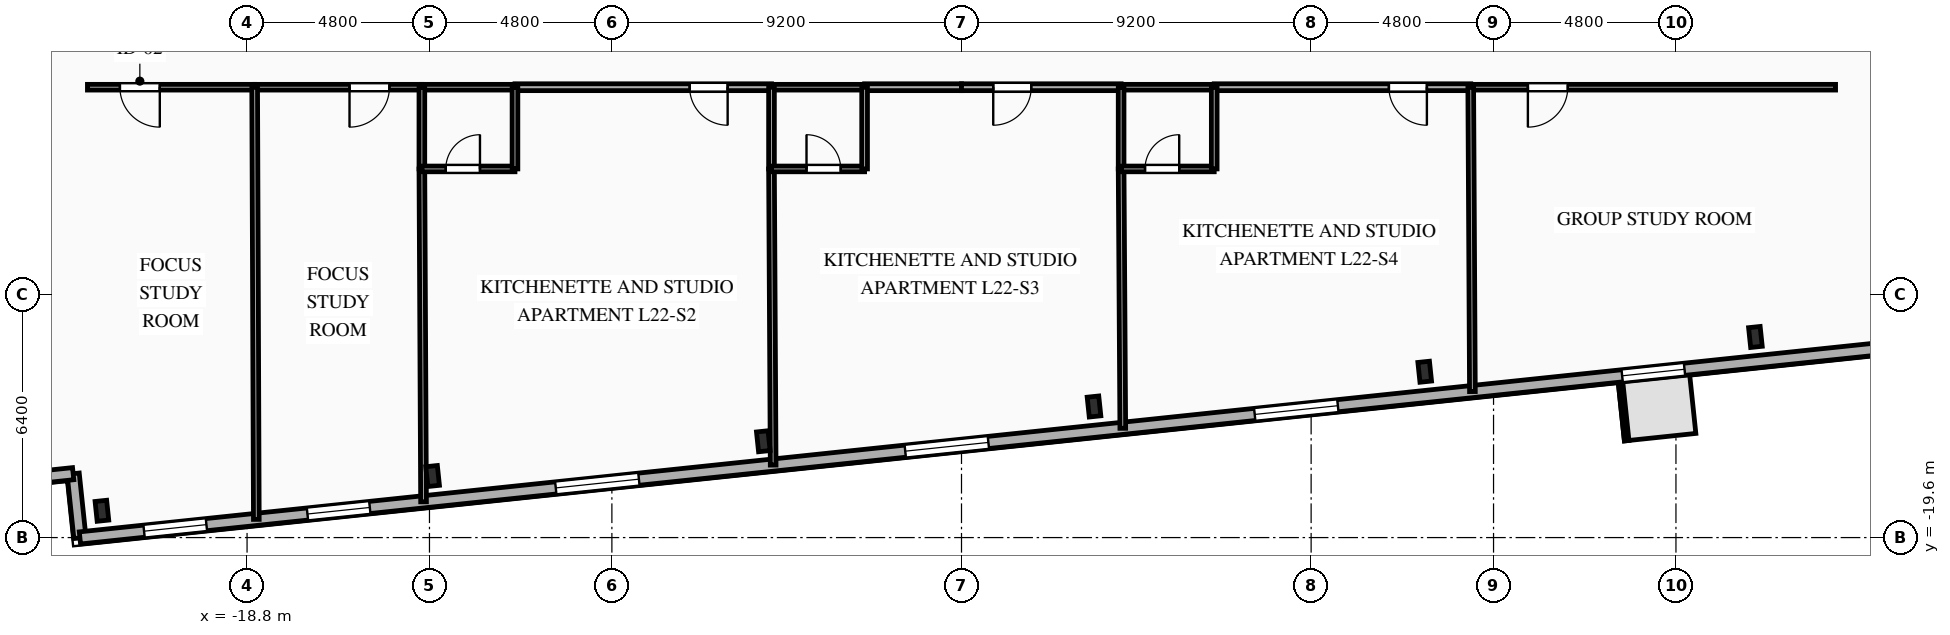
"""IFC4 building model, lengths in metres.
Left out: names, types, materials, properties, quantities, classifications, styles, units other than length and angle.
Written with IfcOpenShell. Run it as: python <this file> out.ifc"""

import sys

from ifc_helpers import new_model, si_unit, direction, frame, frame_2d, origin, origin_2d, place, context, subcontext, project, spatial, rectangle, i_section, extrude, element, fill, save


model = new_model("IFC4")
c1 = context("Model", 3, precision=1e-05, world=origin(), true_north=direction((0.0, 1.0)))
c2 = subcontext(c1, "Body", "Model", "MODEL_VIEW")
j1 = project(units=[si_unit("LENGTHUNIT", "METRE"), si_unit("PLANEANGLEUNIT", "RADIAN")], contexts=[c1])
p1 = place(None, origin())
s1 = spatial("IfcSite", under=j1, at=p1, CompositionType="ELEMENT")
p2 = place(p1, origin())
s2 = spatial("IfcBuilding", under=s1, at=p2, CompositionType="ELEMENT")
p3 = place(p2, frame((0.0, 0.0, 82.35)))
s3 = spatial("IfcBuildingStorey", under=s2, at=p3, CompositionType="ELEMENT", Elevation=82.35)
for number, where, z_axis, x_axis in (
    (1, (-22.619, -18.895, 0.0), (0.0, 0.0, 1.0), (0.995, 0.105, 0.0)),
    (2, (-13.917, -17.98, 0.0), (0.0, 0.0, 1.0), (0.995, 0.105, 0.0)),
    (3, (-5.215, -17.066, 0.0), (0.0, 0.0, 1.0), (0.995, 0.105, 0.0)),
    (4, (3.487, -16.151, 0.0), (0.0, 0.0, 1.0), (0.995, 0.105, 0.0)),
    (5, (12.189, -15.237, 0.0), (0.0, 0.0, 1.0), (0.995, 0.105, 0.0)),
    (6, (20.891, -14.322, 0.0), (0.0, 0.0, 1.0), (0.995, 0.105, 0.0)),
):
    element("IfcColumn", number, at=place(p3, frame(where, z_axis=z_axis, x_axis=x_axis)), inside=s3, PredefinedType="COLUMN", context=c2, shape_type="SweptSolid", body=[
        extrude(i_section(OverallWidth=0.306, OverallDepth=0.524, WebThickness=0.021, FlangeThickness=0.04, FilletRadius=0.027, at=origin_2d()), origin(), (0.0, 0.0, 1.0), 3.35),
    ])
for number, where, z_axis, x_axis in (
    (7, (-23.198, -19.609, 0.0), (0.0, 0.0, 1.0), (-0.105, 0.995, 0.0)),
    (8, (-23.376, -17.919, 0.0), (0.0, 0.0, 1.0), (-0.995, -0.105, 0.0)),
):
    element("IfcWall", number, at=place(p3, frame(where, z_axis=z_axis, x_axis=x_axis)), inside=s3, PredefinedType="SOLIDWALL", context=c2, shape_type="SweptSolid", body=[
        extrude(rectangle(XDim=1.7, YDim=0.32, at=frame_2d((0.85, 0.0))), origin(), (0.0, 0.0, 1.0), 3.045),
    ])
p4 = place(p3, frame((30.307, -13.986, 0.0), z_axis=(0.0, 0.0, 1.0), x_axis=(-0.994521628355, -0.104531003701, 0.0)))
e9 = element("IfcWall", 9, at=p4, inside=s3, PredefinedType="SOLIDWALL", context=c2, shape_type="SweptSolid", body=[
    extrude(rectangle(XDim=53.8, YDim=0.32, at=frame_2d((26.9, 0.0))), origin(), (0.0, 0.0, 1.0), 3.045),
])
p5 = place(p4, frame((11.344, 0.0, 0.85)))
e10 = element("IfcOpeningElement", 10, at=p5, cuts=e9, PredefinedType="OPENING", context=c2, shape_type="SweptSolid", body=[
    extrude(rectangle(XDim=1.65, YDim=1.85, at=frame_2d((0.825, 0.925))), frame((0.0, 0.17, 0.0), z_axis=(0.0, -1.0, 0.0), x_axis=(1.0, 0.0, 0.0)), (0.0, 0.0, 1.0), 0.34),
])
p6 = place(p4, frame((20.516, 0.0, 0.85)))
e11 = element("IfcOpeningElement", 11, at=p6, cuts=e9, PredefinedType="OPENING", context=c2, shape_type="SweptSolid", body=[
    extrude(rectangle(XDim=2.2, YDim=1.85, at=frame_2d((1.1, 0.925))), frame((0.0, 0.17, 0.0), z_axis=(0.0, -1.0, 0.0), x_axis=(1.0, 0.0, 0.0)), (0.0, 0.0, 1.0), 0.34),
])
p7 = place(p4, frame((29.763, 0.0, 0.85)))
e12 = element("IfcOpeningElement", 12, at=p7, cuts=e9, PredefinedType="OPENING", context=c2, shape_type="SweptSolid", body=[
    extrude(rectangle(XDim=2.2, YDim=1.85, at=frame_2d((1.1, 0.925))), frame((0.0, 0.17, 0.0), z_axis=(0.0, -1.0, 0.0), x_axis=(1.0, 0.0, 0.0)), (0.0, 0.0, 1.0), 0.34),
])
p8 = place(p4, frame((39.01, 0.0, 0.85)))
e13 = element("IfcOpeningElement", 13, at=p8, cuts=e9, PredefinedType="OPENING", context=c2, shape_type="SweptSolid", body=[
    extrude(rectangle(XDim=2.2, YDim=1.85, at=frame_2d((1.1, 0.925))), frame((0.0, 0.17, 0.0), z_axis=(0.0, -1.0, 0.0), x_axis=(1.0, 0.0, 0.0)), (0.0, 0.0, 1.0), 0.34),
])
p9 = place(p4, frame((46.13, 0.0, 0.85)))
e14 = element("IfcOpeningElement", 14, at=p9, cuts=e9, PredefinedType="OPENING", context=c2, shape_type="SweptSolid", body=[
    extrude(rectangle(XDim=1.65, YDim=1.85, at=frame_2d((0.825, 0.925))), frame((0.0, 0.17, 0.0), z_axis=(0.0, -1.0, 0.0), x_axis=(1.0, 0.0, 0.0)), (0.0, 0.0, 1.0), 0.34),
])
p10 = place(p4, frame((50.453, 0.0, 0.85)))
e15 = element("IfcOpeningElement", 15, at=p10, cuts=e9, PredefinedType="OPENING", context=c2, shape_type="SweptSolid", body=[
    extrude(rectangle(XDim=1.65, YDim=1.85, at=frame_2d((0.825, 0.925))), frame((0.0, 0.17, 0.0), z_axis=(0.0, -1.0, 0.0), x_axis=(1.0, 0.0, 0.0)), (0.0, 0.0, 1.0), 0.34),
])
p11 = place(p3, frame((-18.6, -7.75, 0.0), z_axis=(0.0, 0.0, 1.0), x_axis=(-1.0, 0.0, 0.0)))
e16 = element("IfcWall", 16, at=p11, inside=s3, PredefinedType="PARTITIONING", context=c2, shape_type="SweptSolid", body=[
    extrude(rectangle(XDim=4.4, YDim=0.15, at=frame_2d((2.2, 0.0))), origin(), (0.0, 0.0, 1.0), 3.045),
])
p12 = place(p11, frame((2.496, 0.0, 0.0)))
e17 = element("IfcOpeningElement", 17, at=p12, cuts=e16, PredefinedType="OPENING", context=c2, shape_type="SweptSolid", body=[
    extrude(rectangle(XDim=1.05, YDim=2.15, at=frame_2d((0.525, 1.075))), frame((0.0, 0.085, 0.0), z_axis=(0.0, -1.0, 0.0), x_axis=(1.0, 0.0, 0.0)), (0.0, 0.0, 1.0), 0.17),
])
p13 = place(p3, frame((-14.2, -7.75, 0.0), z_axis=(0.0, 0.0, 1.0), x_axis=(-1.0, 0.0, 0.0)))
e18 = element("IfcWall", 18, at=p13, inside=s3, PredefinedType="PARTITIONING", context=c2, shape_type="SweptSolid", body=[
    extrude(rectangle(XDim=4.4, YDim=0.15, at=frame_2d((2.2, 0.0))), origin(), (0.0, 0.0, 1.0), 3.045),
])
p14 = place(p13, frame((0.854, 0.0, 0.0)))
e19 = element("IfcOpeningElement", 19, at=p14, cuts=e18, PredefinedType="OPENING", context=c2, shape_type="SweptSolid", body=[
    extrude(rectangle(XDim=1.05, YDim=2.15, at=frame_2d((0.525, 1.075))), frame((0.0, 0.085, 0.0), z_axis=(0.0, -1.0, 0.0), x_axis=(1.0, 0.0, 0.0)), (0.0, 0.0, 1.0), 0.17),
])
p15 = place(p3, frame((-5.0, -7.75, 0.0), z_axis=(0.0, 0.0, 1.0), x_axis=(-1.0, 0.0, 0.0)))
e20 = element("IfcWall", 20, at=p15, inside=s3, PredefinedType="PARTITIONING", context=c2, shape_type="SweptSolid", body=[
    extrude(rectangle(XDim=6.75, YDim=0.18, at=frame_2d((3.375, 0.0))), origin(), (0.0, 0.0, 1.0), 3.045),
])
p16 = place(p15, frame((1.154, 0.0, 0.0)))
e21 = element("IfcOpeningElement", 21, at=p16, cuts=e20, PredefinedType="OPENING", context=c2, shape_type="SweptSolid", body=[
    extrude(rectangle(XDim=1.0, YDim=2.15, at=frame_2d((0.5, 1.075))), frame((0.0, 0.1, 0.0), z_axis=(0.0, -1.0, 0.0), x_axis=(1.0, 0.0, 0.0)), (0.0, 0.0, 1.0), 0.2),
])
p17 = place(p3, frame((-11.75, -7.75, 0.0), z_axis=(0.0, 0.0, 1.0), x_axis=(-1.0, 0.0, 0.0)))
e22 = element("IfcWall", 22, at=p17, inside=s3, PredefinedType="PLUMBINGWALL", context=c2, shape_type="SweptSolid", body=[
    extrude(rectangle(XDim=2.45, YDim=0.15, at=frame_2d((1.225, 0.0))), origin(), (0.0, 0.0, 1.0), 3.045),
])
p18 = place(p3, frame((0.0, -7.75, 0.0), z_axis=(0.0, 0.0, 1.0), x_axis=(-1.0, 0.0, 0.0)))
e23 = element("IfcWall", 23, at=p18, inside=s3, PredefinedType="PARTITIONING", context=c2, shape_type="SweptSolid", body=[
    extrude(rectangle(XDim=2.55, YDim=0.18, at=frame_2d((1.275, 0.0))), origin(), (0.0, 0.0, 1.0), 3.045),
])
p19 = place(p3, frame((-2.55, -7.75, 0.0), z_axis=(0.0, 0.0, 1.0), x_axis=(-1.0, 0.0, 0.0)))
e24 = element("IfcWall", 24, at=p19, inside=s3, PredefinedType="PLUMBINGWALL", context=c2, shape_type="SweptSolid", body=[
    extrude(rectangle(XDim=2.45, YDim=0.15, at=frame_2d((1.225, 0.0))), origin(), (0.0, 0.0, 1.0), 3.045),
])
p20 = place(p3, frame((4.2, -7.75, 0.0), z_axis=(0.0, 0.0, 1.0), x_axis=(-1.0, 0.0, 0.0)))
e25 = element("IfcWall", 25, at=p20, inside=s3, PredefinedType="PARTITIONING", context=c2, shape_type="SweptSolid", body=[
    extrude(rectangle(XDim=4.2, YDim=0.18, at=frame_2d((2.1, 0.0))), origin(), (0.0, 0.0, 1.0), 3.045),
])
p21 = place(p20, frame((2.365, 0.0, 0.0)))
e26 = element("IfcOpeningElement", 26, at=p21, cuts=e25, PredefinedType="OPENING", context=c2, shape_type="SweptSolid", body=[
    extrude(rectangle(XDim=1.0, YDim=2.15, at=frame_2d((0.5, 1.075))), frame((0.0, 0.1, 0.0), z_axis=(0.0, -1.0, 0.0), x_axis=(1.0, 0.0, 0.0)), (0.0, 0.0, 1.0), 0.2),
])
p22 = place(p3, frame((13.4, -7.75, 0.0), z_axis=(0.0, 0.0, 1.0), x_axis=(-1.0, 0.0, 0.0)))
e27 = element("IfcWall", 27, at=p22, inside=s3, PredefinedType="PARTITIONING", context=c2, shape_type="SweptSolid", body=[
    extrude(rectangle(XDim=6.75, YDim=0.18, at=frame_2d((3.375, 0.0))), origin(), (0.0, 0.0, 1.0), 3.045),
])
p23 = place(p22, frame((1.154, 0.0, 0.0)))
e28 = element("IfcOpeningElement", 28, at=p23, cuts=e27, PredefinedType="OPENING", context=c2, shape_type="SweptSolid", body=[
    extrude(rectangle(XDim=1.0, YDim=2.15, at=frame_2d((0.5, 1.075))), frame((0.0, 0.1, 0.0), z_axis=(0.0, -1.0, 0.0), x_axis=(1.0, 0.0, 0.0)), (0.0, 0.0, 1.0), 0.2),
])
p24 = place(p3, frame((6.65, -7.75, 0.0), z_axis=(0.0, 0.0, 1.0), x_axis=(-1.0, 0.0, 0.0)))
e29 = element("IfcWall", 29, at=p24, inside=s3, PredefinedType="PLUMBINGWALL", context=c2, shape_type="SweptSolid", body=[
    extrude(rectangle(XDim=2.45, YDim=0.15, at=frame_2d((1.225, 0.0))), origin(), (0.0, 0.0, 1.0), 3.045),
])
p25 = place(p3, frame((23.0, -7.75, 0.0), z_axis=(0.0, 0.0, 1.0), x_axis=(-1.0, 0.0, 0.0)))
e30 = element("IfcWall", 30, at=p25, inside=s3, PredefinedType="PARTITIONING", context=c2, shape_type="SweptSolid", body=[
    extrude(rectangle(XDim=9.6, YDim=0.15, at=frame_2d((4.8, 0.0))), origin(), (0.0, 0.0, 1.0), 3.045),
])
p26 = place(p25, frame((7.046, 0.0, 0.0)))
e31 = element("IfcOpeningElement", 31, at=p26, cuts=e30, PredefinedType="OPENING", context=c2, shape_type="SweptSolid", body=[
    extrude(rectangle(XDim=1.05, YDim=2.15, at=frame_2d((0.525, 1.075))), frame((0.0, 0.085, 0.0), z_axis=(0.0, -1.0, 0.0), x_axis=(1.0, 0.0, 0.0)), (0.0, 0.0, 1.0), 0.17),
])
p27 = place(p3, frame((-18.6, -7.75, 0.0), z_axis=(0.0, 0.0, 1.0), x_axis=(0.003864456523, -0.99999253296, 0.0)))
e32 = element("IfcWall", 32, at=p27, inside=s3, PredefinedType="PARTITIONING", context=c2, shape_type="SweptSolid", body=[
    extrude(rectangle(XDim=11.372, YDim=0.15, at=frame_2d((5.686, 0.0))), origin(), (0.0, 0.0, 1.0), 3.045),
])
p28 = place(p3, frame((-14.2, -9.9, 0.0), z_axis=(0.0, 0.0, 1.0), x_axis=(0.005017078758, -0.999987414381, 0.0)))
e33 = element("IfcWall", 33, at=p28, inside=s3, PredefinedType="PARTITIONING", context=c2, shape_type="SweptSolid", body=[
    extrude(rectangle(XDim=8.759, YDim=0.15, at=frame_2d((4.379, 0.0))), origin(), (0.0, 0.0, 1.0), 3.045),
])
p29 = place(p3, frame((-14.2, -7.75, 0.0), z_axis=(0.0, 0.0, 1.0), x_axis=(0.0, -1.0, 0.0)))
e34 = element("IfcWall", 34, at=p29, inside=s3, PredefinedType="PLUMBINGWALL", context=c2, shape_type="SweptSolid", body=[
    extrude(rectangle(XDim=2.15, YDim=0.15, at=frame_2d((1.075, 0.0))), origin(), (0.0, 0.0, 1.0), 3.045),
])
p30 = place(p3, frame((-14.2, -9.9, 0.0), z_axis=(0.0, 0.0, 1.0), x_axis=(1.0, 0.0, 0.0)))
e35 = element("IfcWall", 35, at=p30, inside=s3, PredefinedType="PLUMBINGWALL", context=c2, shape_type="SweptSolid", body=[
    extrude(rectangle(XDim=2.45, YDim=0.15, at=frame_2d((1.225, 0.0))), origin(), (0.0, 0.0, 1.0), 3.045),
])
p31 = place(p30, frame((0.629, 0.0, 0.0)))
e36 = element("IfcOpeningElement", 36, at=p31, cuts=e35, PredefinedType="OPENING", context=c2, shape_type="SweptSolid", body=[
    extrude(rectangle(XDim=0.9, YDim=2.1, at=frame_2d((0.45, 1.05))), frame((0.0, 0.085, 0.0), z_axis=(0.0, -1.0, 0.0), x_axis=(1.0, 0.0, 0.0)), (0.0, 0.0, 1.0), 0.17),
])
p32 = place(p3, frame((-11.75, -9.9, 0.0), z_axis=(0.0, 0.0, 1.0), x_axis=(0.0, 1.0, 0.0)))
e37 = element("IfcWall", 37, at=p32, inside=s3, PredefinedType="PLUMBINGWALL", context=c2, shape_type="SweptSolid", body=[
    extrude(rectangle(XDim=2.15, YDim=0.15, at=frame_2d((1.075, 0.0))), origin(), (0.0, 0.0, 1.0), 3.045),
])
p33 = place(p3, frame((-5.0, -9.9, 0.0), z_axis=(0.0, 0.0, 1.0), x_axis=(0.005639538101, -0.999984097679, 0.0)))
e38 = element("IfcWall", 38, at=p33, inside=s3, PredefinedType="PARTITIONING", context=c2, shape_type="SweptSolid", body=[
    extrude(rectangle(XDim=7.792, YDim=0.15, at=frame_2d((3.896, 0.0))), origin(), (0.0, 0.0, 1.0), 3.045),
])
p34 = place(p3, frame((-5.0, -7.75, 0.0), z_axis=(0.0, 0.0, 1.0), x_axis=(0.0, -1.0, 0.0)))
e39 = element("IfcWall", 39, at=p34, inside=s3, PredefinedType="PLUMBINGWALL", context=c2, shape_type="SweptSolid", body=[
    extrude(rectangle(XDim=2.15, YDim=0.15, at=frame_2d((1.075, 0.0))), origin(), (0.0, 0.0, 1.0), 3.045),
])
p35 = place(p3, frame((-5.0, -9.9, 0.0), z_axis=(0.0, 0.0, 1.0), x_axis=(1.0, 0.0, 0.0)))
e40 = element("IfcWall", 40, at=p35, inside=s3, PredefinedType="PLUMBINGWALL", context=c2, shape_type="SweptSolid", body=[
    extrude(rectangle(XDim=2.45, YDim=0.15, at=frame_2d((1.225, 0.0))), origin(), (0.0, 0.0, 1.0), 3.045),
])
p36 = place(p35, frame((0.921, 0.0, 0.0)))
e41 = element("IfcOpeningElement", 41, at=p36, cuts=e40, PredefinedType="OPENING", context=c2, shape_type="SweptSolid", body=[
    extrude(rectangle(XDim=0.9, YDim=2.1, at=frame_2d((0.45, 1.05))), frame((0.0, 0.085, 0.0), z_axis=(0.0, -1.0, 0.0), x_axis=(1.0, 0.0, 0.0)), (0.0, 0.0, 1.0), 0.17),
])
p37 = place(p3, frame((-2.55, -9.9, 0.0), z_axis=(0.0, 0.0, 1.0), x_axis=(0.0, 1.0, 0.0)))
e42 = element("IfcWall", 42, at=p37, inside=s3, PredefinedType="PLUMBINGWALL", context=c2, shape_type="SweptSolid", body=[
    extrude(rectangle(XDim=2.15, YDim=0.15, at=frame_2d((1.075, 0.0))), origin(), (0.0, 0.0, 1.0), 3.045),
])
p38 = place(p3, frame((4.2, -9.9, 0.0), z_axis=(0.0, 0.0, 1.0), x_axis=(0.00643855591, -0.999979272284, 0.0)))
e43 = element("IfcWall", 43, at=p38, inside=s3, PredefinedType="PARTITIONING", context=c2, shape_type="SweptSolid", body=[
    extrude(rectangle(XDim=6.825, YDim=0.15, at=frame_2d((3.413, 0.0))), origin(), (0.0, 0.0, 1.0), 3.045),
])
p39 = place(p3, frame((4.2, -7.75, 0.0), z_axis=(0.0, 0.0, 1.0), x_axis=(0.0, -1.0, 0.0)))
e44 = element("IfcWall", 44, at=p39, inside=s3, PredefinedType="PLUMBINGWALL", context=c2, shape_type="SweptSolid", body=[
    extrude(rectangle(XDim=2.15, YDim=0.15, at=frame_2d((1.075, 0.0))), origin(), (0.0, 0.0, 1.0), 3.045),
])
p40 = place(p3, frame((4.2, -9.9, 0.0), z_axis=(0.0, 0.0, 1.0), x_axis=(1.0, 0.0, 0.0)))
e45 = element("IfcWall", 45, at=p40, inside=s3, PredefinedType="PLUMBINGWALL", context=c2, shape_type="SweptSolid", body=[
    extrude(rectangle(XDim=2.45, YDim=0.15, at=frame_2d((1.225, 0.0))), origin(), (0.0, 0.0, 1.0), 3.045),
])
p41 = place(p40, frame((0.629, 0.0, 0.0)))
e46 = element("IfcOpeningElement", 46, at=p41, cuts=e45, PredefinedType="OPENING", context=c2, shape_type="SweptSolid", body=[
    extrude(rectangle(XDim=0.9, YDim=2.1, at=frame_2d((0.45, 1.05))), frame((0.0, 0.085, 0.0), z_axis=(0.0, -1.0, 0.0), x_axis=(1.0, 0.0, 0.0)), (0.0, 0.0, 1.0), 0.17),
])
p42 = place(p3, frame((6.65, -9.9, 0.0), z_axis=(0.0, 0.0, 1.0), x_axis=(0.0, 1.0, 0.0)))
e47 = element("IfcWall", 47, at=p42, inside=s3, PredefinedType="PLUMBINGWALL", context=c2, shape_type="SweptSolid", body=[
    extrude(rectangle(XDim=2.15, YDim=0.15, at=frame_2d((1.075, 0.0))), origin(), (0.0, 0.0, 1.0), 3.045),
])
p43 = place(p3, frame((13.4, -7.75, 0.0), z_axis=(0.0, 0.0, 1.0), x_axis=(0.005487554946, -0.999984943257, 0.0)))
e48 = element("IfcWall", 48, at=p43, inside=s3, PredefinedType="PARTITIONING", context=c2, shape_type="SweptSolid", body=[
    extrude(rectangle(XDim=8.008, YDim=0.15, at=frame_2d((4.004, 0.0))), origin(), (0.0, 0.0, 1.0), 3.045),
])
p44 = place(p5, origin())
e49 = element("IfcWindow", 49, at=p44, inside=s3, PartitioningType="SINGLE_PANEL", PredefinedType="WINDOW", context=c2, shape_type="SweptSolid", body=[
    extrude(rectangle(XDim=1.65, YDim=1.85, at=frame_2d((0.825, 0.925))), frame((0.0, 0.03, 0.0), z_axis=(0.0, -1.0, 0.0), x_axis=(1.0, 0.0, 0.0)), (0.0, 0.0, 1.0), 0.06),
])
fill(e10, e49)
p45 = place(p6, origin())
e50 = element("IfcWindow", 50, at=p45, inside=s3, PartitioningType="SINGLE_PANEL", PredefinedType="WINDOW", context=c2, shape_type="SweptSolid", body=[
    extrude(rectangle(XDim=2.2, YDim=1.85, at=frame_2d((1.1, 0.925))), frame((0.0, 0.03, 0.0), z_axis=(0.0, -1.0, 0.0), x_axis=(1.0, 0.0, 0.0)), (0.0, 0.0, 1.0), 0.06),
])
fill(e11, e50)
p46 = place(p7, origin())
e51 = element("IfcWindow", 51, at=p46, inside=s3, PartitioningType="SINGLE_PANEL", PredefinedType="WINDOW", context=c2, shape_type="SweptSolid", body=[
    extrude(rectangle(XDim=2.2, YDim=1.85, at=frame_2d((1.1, 0.925))), frame((0.0, 0.03, 0.0), z_axis=(0.0, -1.0, 0.0), x_axis=(1.0, 0.0, 0.0)), (0.0, 0.0, 1.0), 0.06),
])
fill(e12, e51)
p47 = place(p8, origin())
e52 = element("IfcWindow", 52, at=p47, inside=s3, PartitioningType="SINGLE_PANEL", PredefinedType="WINDOW", context=c2, shape_type="SweptSolid", body=[
    extrude(rectangle(XDim=2.2, YDim=1.85, at=frame_2d((1.1, 0.925))), frame((0.0, 0.03, 0.0), z_axis=(0.0, -1.0, 0.0), x_axis=(1.0, 0.0, 0.0)), (0.0, 0.0, 1.0), 0.06),
])
fill(e13, e52)
p48 = place(p9, origin())
e53 = element("IfcWindow", 53, at=p48, inside=s3, PartitioningType="SINGLE_PANEL", PredefinedType="WINDOW", context=c2, shape_type="SweptSolid", body=[
    extrude(rectangle(XDim=1.65, YDim=1.85, at=frame_2d((0.825, 0.925))), frame((0.0, 0.03, 0.0), z_axis=(0.0, -1.0, 0.0), x_axis=(1.0, 0.0, 0.0)), (0.0, 0.0, 1.0), 0.06),
])
fill(e14, e53)
p49 = place(p10, origin())
e54 = element("IfcWindow", 54, at=p49, inside=s3, PartitioningType="SINGLE_PANEL", PredefinedType="WINDOW", context=c2, shape_type="SweptSolid", body=[
    extrude(rectangle(XDim=1.65, YDim=1.85, at=frame_2d((0.825, 0.925))), frame((0.0, 0.03, 0.0), z_axis=(0.0, -1.0, 0.0), x_axis=(1.0, 0.0, 0.0)), (0.0, 0.0, 1.0), 0.06),
])
fill(e15, e54)
p50 = place(p12, origin())
e55 = element("IfcDoor", 55, at=p50, inside=s3, OperationType="SINGLE_SWING_LEFT", PredefinedType="DOOR", context=c2, shape_type="SweptSolid", body=[
    extrude(rectangle(XDim=1.05, YDim=2.15, at=frame_2d((0.525, 1.075))), frame((0.0, 0.025, 0.0), z_axis=(0.0, -1.0, 0.0), x_axis=(1.0, 0.0, 0.0)), (0.0, 0.0, 1.0), 0.05),
])
fill(e17, e55)
p51 = place(p14, origin())
e56 = element("IfcDoor", 56, at=p51, inside=s3, OperationType="SINGLE_SWING_RIGHT", PredefinedType="DOOR", context=c2, shape_type="SweptSolid", body=[
    extrude(rectangle(XDim=1.05, YDim=2.15, at=frame_2d((0.525, 1.075))), frame((0.0, 0.025, 0.0), z_axis=(0.0, -1.0, 0.0), x_axis=(1.0, 0.0, 0.0)), (0.0, 0.0, 1.0), 0.05),
])
fill(e19, e56)
p52 = place(p16, origin())
e57 = element("IfcDoor", 57, at=p52, inside=s3, OperationType="SINGLE_SWING_LEFT", PredefinedType="DOOR", context=c2, shape_type="SweptSolid", body=[
    extrude(rectangle(XDim=1.0, YDim=2.15, at=frame_2d((0.5, 1.075))), frame((0.0, 0.025, 0.0), z_axis=(0.0, -1.0, 0.0), x_axis=(1.0, 0.0, 0.0)), (0.0, 0.0, 1.0), 0.05),
])
fill(e21, e57)
p53 = place(p21, origin())
e58 = element("IfcDoor", 58, at=p53, inside=s3, OperationType="SINGLE_SWING_RIGHT", PredefinedType="DOOR", context=c2, shape_type="SweptSolid", body=[
    extrude(rectangle(XDim=1.0, YDim=2.15, at=frame_2d((0.5, 1.075))), frame((0.0, 0.025, 0.0), z_axis=(0.0, -1.0, 0.0), x_axis=(1.0, 0.0, 0.0)), (0.0, 0.0, 1.0), 0.05),
])
fill(e26, e58)
p54 = place(p23, origin())
e59 = element("IfcDoor", 59, at=p54, inside=s3, OperationType="SINGLE_SWING_LEFT", PredefinedType="DOOR", context=c2, shape_type="SweptSolid", body=[
    extrude(rectangle(XDim=1.0, YDim=2.15, at=frame_2d((0.5, 1.075))), frame((0.0, 0.025, 0.0), z_axis=(0.0, -1.0, 0.0), x_axis=(1.0, 0.0, 0.0)), (0.0, 0.0, 1.0), 0.05),
])
fill(e28, e59)
p55 = place(p26, origin())
e60 = element("IfcDoor", 60, at=p55, inside=s3, OperationType="SINGLE_SWING_RIGHT", PredefinedType="DOOR", context=c2, shape_type="SweptSolid", body=[
    extrude(rectangle(XDim=1.05, YDim=2.15, at=frame_2d((0.525, 1.075))), frame((0.0, 0.025, 0.0), z_axis=(0.0, -1.0, 0.0), x_axis=(1.0, 0.0, 0.0)), (0.0, 0.0, 1.0), 0.05),
])
fill(e31, e60)
p56 = place(p31, origin())
e61 = element("IfcDoor", 61, at=p56, inside=s3, OperationType="SINGLE_SWING_RIGHT", PredefinedType="DOOR", context=c2, shape_type="SweptSolid", body=[
    extrude(rectangle(XDim=0.9, YDim=2.1, at=frame_2d((0.45, 1.05))), frame((0.0, 0.025, 0.0), z_axis=(0.0, -1.0, 0.0), x_axis=(1.0, 0.0, 0.0)), (0.0, 0.0, 1.0), 0.05),
])
fill(e36, e61)
p57 = place(p36, origin())
e62 = element("IfcDoor", 62, at=p57, inside=s3, OperationType="SINGLE_SWING_LEFT", PredefinedType="DOOR", context=c2, shape_type="SweptSolid", body=[
    extrude(rectangle(XDim=0.9, YDim=2.1, at=frame_2d((0.45, 1.05))), frame((0.0, 0.025, 0.0), z_axis=(0.0, -1.0, 0.0), x_axis=(1.0, 0.0, 0.0)), (0.0, 0.0, 1.0), 0.05),
])
fill(e41, e62)
p58 = place(p41, origin())
e63 = element("IfcDoor", 63, at=p58, inside=s3, OperationType="SINGLE_SWING_RIGHT", PredefinedType="DOOR", context=c2, shape_type="SweptSolid", body=[
    extrude(rectangle(XDim=0.9, YDim=2.1, at=frame_2d((0.45, 1.05))), frame((0.0, 0.025, 0.0), z_axis=(0.0, -1.0, 0.0), x_axis=(1.0, 0.0, 0.0)), (0.0, 0.0, 1.0), 0.05),
])
fill(e46, e63)
save(model, sys.argv[1])
